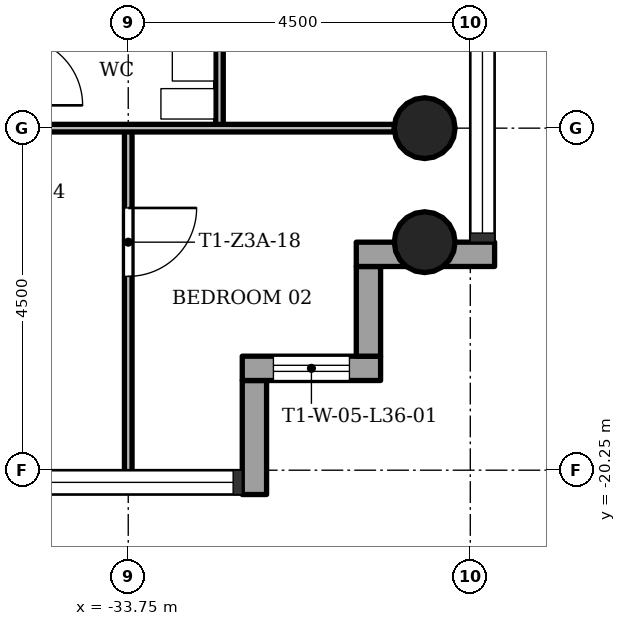
"""IFC4 building model, lengths in metres.
Left out: names, types, materials, properties, quantities, classifications, styles, units other than length and angle.
Written with IfcOpenShell. Run it as: python <this file> out.ifc"""

import sys

from ifc_helpers import new_model, si_unit, direction, frame, frame_2d, origin, origin_2d, place, context, subcontext, project, spatial, rectangle, hollow_circle, extrude, element, fill, save


model = new_model("IFC4")
c1 = context("Model", 3, precision=1e-05, world=origin(), true_north=direction((0.0, 1.0)))
c2 = subcontext(c1, "Body", "Model", "MODEL_VIEW")
j1 = project(units=[si_unit("LENGTHUNIT", "METRE"), si_unit("PLANEANGLEUNIT", "RADIAN")], contexts=[c1])
p1 = place(None, origin())
s1 = spatial("IfcSite", under=j1, at=p1, CompositionType="ELEMENT")
p2 = place(p1, origin())
s2 = spatial("IfcBuilding", under=s1, at=p2, CompositionType="ELEMENT")
p3 = place(p2, frame((0.0, 0.0, 133.7)))
s3 = spatial("IfcBuildingStorey", under=s2, at=p3, CompositionType="ELEMENT", Elevation=133.7)
for number, where, z_axis, x_axis in (
    (1, (-29.85, -15.75, 0.0), (0.0, 0.0, 1.0), (1.0, 0.0, 0.0)),
    (2, (-29.85, -17.25, 0.0), (0.0, 0.0, 1.0), (1.0, 0.0, 0.0)),
):
    element("IfcColumn", number, at=place(p3, frame(where, z_axis=z_axis, x_axis=x_axis)), inside=s3, PredefinedType="COLUMN", context=c2, shape_type="SweptSolid", body=[
        extrude(hollow_circle(Radius=0.4, WallThickness=0.028, at=origin_2d()), origin(), (0.0, 0.0, 1.0), 3.4),
    ])
p4 = place(p3, frame((-32.09, -20.57, -0.3), z_axis=(0.0, 0.0, 1.0), x_axis=(0.0, 1.0, 0.0)))
e3 = element("IfcWall", 3, at=p4, inside=s3, PredefinedType="STANDARD", context=c2, shape_type="SweptSolid", body=[
    extrude(rectangle(XDim=1.5, YDim=0.32, at=frame_2d((0.75, 0.0))), origin(), (0.0, 0.0, 1.0), 3.4),
])
p5 = place(p3, frame((-32.25, -18.91, -0.3), z_axis=(0.0, 0.0, 1.0), x_axis=(1.0, 0.0, 0.0)))
e4 = element("IfcWall", 4, at=p5, inside=s3, PredefinedType="STANDARD", context=c2, shape_type="SweptSolid", body=[
    extrude(rectangle(XDim=1.82, YDim=0.32, at=frame_2d((0.91, 0.0))), origin(), (0.0, 0.0, 1.0), 3.4),
])
p6 = place(p5, frame((0.41, 0.0, 1.2)))
e5 = element("IfcOpeningElement", 5, at=p6, cuts=e4, PredefinedType="OPENING", context=c2, shape_type="SweptSolid", body=[
    extrude(rectangle(XDim=1.0, YDim=1.5, at=frame_2d((0.5, 0.75))), frame((0.0, 0.17, 0.0), z_axis=(0.0, -1.0, 0.0), x_axis=(1.0, 0.0, 0.0)), (0.0, 0.0, 1.0), 0.34),
])
p7 = place(p3, frame((-30.59, -18.75, -0.3), z_axis=(0.0, 0.0, 1.0), x_axis=(0.0, 1.0, 0.0)))
e6 = element("IfcWall", 6, at=p7, inside=s3, PredefinedType="STANDARD", context=c2, shape_type="SweptSolid", body=[
    extrude(rectangle(XDim=1.18, YDim=0.32, at=frame_2d((0.59, 0.0))), origin(), (0.0, 0.0, 1.0), 3.4),
])
p8 = place(p3, frame((-30.75, -17.41, -0.3), z_axis=(0.0, 0.0, 1.0), x_axis=(1.0, 0.0, 0.0)))
e7 = element("IfcWall", 7, at=p8, inside=s3, PredefinedType="STANDARD", context=c2, shape_type="SweptSolid", body=[
    extrude(rectangle(XDim=1.82, YDim=0.32, at=frame_2d((0.91, 0.0))), origin(), (0.0, 0.0, 1.0), 3.4),
])
p9 = place(p3, frame((-33.75, -20.35, 0.0), z_axis=(0.0, 0.0, 1.0), x_axis=(0.0, 1.0, 0.0)))
e8 = element("IfcWall", 8, at=p9, inside=s3, PredefinedType="PARTITIONING", context=c2, shape_type="SweptSolid", body=[
    extrude(rectangle(XDim=4.6, YDim=0.1, at=frame_2d((2.3, 0.0))), origin(), (0.0, 0.0, 1.0), 3.0),
])
p10 = place(p9, frame((2.65, 0.0, 0.0)))
e9 = element("IfcOpeningElement", 9, at=p10, cuts=e8, PredefinedType="OPENING", context=c2, shape_type="SweptSolid", body=[
    extrude(rectangle(XDim=0.9, YDim=2.1, at=frame_2d((0.45, 1.05))), frame((0.0, 0.06, 0.0), z_axis=(0.0, -1.0, 0.0), x_axis=(1.0, 0.0, 0.0)), (0.0, 0.0, 1.0), 0.12),
])
p11 = place(p3, frame((-32.55, -15.75, 0.0), z_axis=(0.0, 0.0, 1.0), x_axis=(0.0, 1.0, 0.0)))
e10 = element("IfcWall", 10, at=p11, inside=s3, PredefinedType="PARTITIONING", context=c2, shape_type="SweptSolid", body=[
    extrude(rectangle(XDim=4.5, YDim=0.1, at=frame_2d((2.25, 0.0))), origin(), (0.0, 0.0, 1.0), 3.0),
])
p12 = place(p11, frame((3.45, 0.0, 0.0)))
e11 = element("IfcOpeningElement", 11, at=p12, cuts=e10, PredefinedType="OPENING", context=c2, shape_type="SweptSolid", body=[
    extrude(rectangle(XDim=0.9, YDim=2.1, at=frame_2d((0.45, 1.05))), frame((0.0, 0.06, 0.0), z_axis=(0.0, -1.0, 0.0), x_axis=(1.0, 0.0, 0.0)), (0.0, 0.0, 1.0), 0.12),
])
p13 = place(p3, frame((-41.75, -15.75, 0.0), z_axis=(0.0, 0.0, 1.0), x_axis=(1.0, 0.0, 0.0)))
e12 = element("IfcWall", 12, at=p13, inside=s3, PredefinedType="PARTITIONING", context=c2, shape_type="SweptSolid", body=[
    extrude(rectangle(XDim=11.5, YDim=0.1, at=frame_2d((5.75, 0.0))), origin(), (0.0, 0.0, 1.0), 3.0),
])
p14 = place(p13, frame((5.3, 0.0, 0.0)))
e13 = element("IfcOpeningElement", 13, at=p14, cuts=e12, PredefinedType="OPENING", context=c2, shape_type="SweptSolid", body=[
    extrude(rectangle(XDim=0.9, YDim=2.1, at=frame_2d((0.45, 1.05))), frame((0.0, 0.06, 0.0), z_axis=(0.0, -1.0, 0.0), x_axis=(1.0, 0.0, 0.0)), (0.0, 0.0, 1.0), 0.12),
])
p15 = place(p10, origin())
e14 = element("IfcDoor", 14, at=p15, inside=s3, OperationType="SINGLE_SWING_RIGHT", PredefinedType="DOOR", context=c2, shape_type="SweptSolid", body=[
    extrude(rectangle(XDim=0.9, YDim=2.1, at=frame_2d((0.45, 1.05))), frame((0.0, 0.025, 0.0), z_axis=(0.0, -1.0, 0.0), x_axis=(1.0, 0.0, 0.0)), (0.0, 0.0, 1.0), 0.05),
])
fill(e9, e14)
p16 = place(p6, origin())
e15 = element("IfcWindow", 15, at=p16, inside=s3, PartitioningType="SINGLE_PANEL", PredefinedType="WINDOW", context=c2, shape_type="SweptSolid", body=[
    extrude(rectangle(XDim=1.0, YDim=1.5, at=frame_2d((0.5, 0.75))), frame((0.0, 0.03, 0.0), z_axis=(0.0, -1.0, 0.0), x_axis=(1.0, 0.0, 0.0)), (0.0, 0.0, 1.0), 0.06),
])
fill(e5, e15)
save(model, sys.argv[1])
